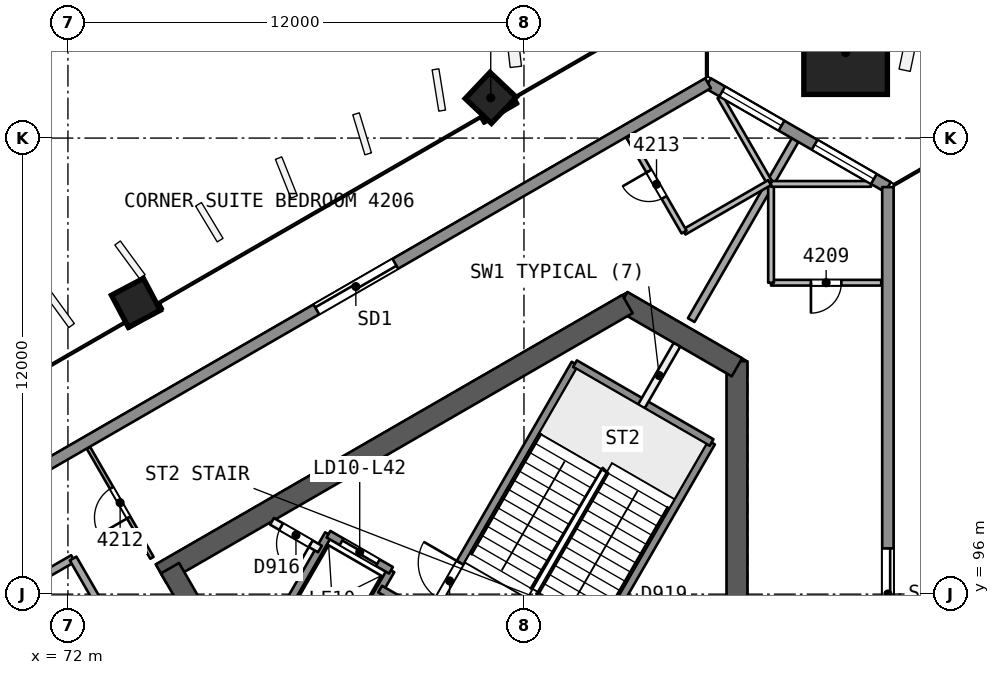
"""IFC4 building model, lengths in metres.
Left out: names, types, materials, properties, quantities, classifications, styles, units other than length and angle.
Written with IfcOpenShell. Run it as: python <this file> out.ifc"""

import sys

from ifc_helpers import new_model, si_unit, direction, frame, frame_2d, origin, origin_2d, place, context, subcontext, project, spatial, rectangle, extrude, element, fill, save


model = new_model("IFC4")
c1 = context("Model", 3, precision=1e-05, world=origin(), true_north=direction((0.0, 1.0)))
c2 = subcontext(c1, "Body", "Model", "MODEL_VIEW")
j1 = project(units=[si_unit("LENGTHUNIT", "METRE"), si_unit("PLANEANGLEUNIT", "RADIAN")], contexts=[c1])
p1 = place(None, origin())
s1 = spatial("IfcSite", under=j1, at=p1, CompositionType="ELEMENT")
p2 = place(p1, origin())
s2 = spatial("IfcBuilding", under=s1, at=p2, CompositionType="ELEMENT")
p3 = place(p2, frame((0.0, 0.0, 174.8)))
s3 = spatial("IfcBuildingStorey", under=s2, at=p3, CompositionType="ELEMENT", Elevation=174.8)
p4 = place(p3, frame((89.605, 88.069, 0.0), z_axis=(0.0, 0.0, 1.0), x_axis=(0.0, 1.0, 0.0)))
e1 = element("IfcWall", 1, at=p4, inside=s3, PredefinedType="SHEAR", context=c2, shape_type="SweptSolid", body=[
    extrude(rectangle(XDim=14.058, YDim=0.55, at=frame_2d((7.029, 0.0))), origin(), (0.0, 0.0, 1.0), 3.7),
])
p5 = place(p3, frame((89.605, 101.969, 0.0), z_axis=(0.0, 0.0, 1.0), x_axis=(-0.865997833373, 0.500047750313, 0.0)))
e2 = element("IfcWall", 2, at=p5, inside=s3, PredefinedType="SHEAR", context=c2, shape_type="SweptSolid", body=[
    extrude(rectangle(XDim=3.487, YDim=0.55, at=frame_2d((1.743, 0.0))), origin(), (0.0, 0.0, 1.0), 3.7),
])
p6 = place(p3, frame((86.723, 103.633, 0.0), z_axis=(0.0, 0.0, 1.0), x_axis=(-0.866023530946, -0.500003243837, 0.0)))
e3 = element("IfcWall", 3, at=p6, inside=s3, PredefinedType="SHEAR", context=c2, shape_type="SweptSolid", body=[
    extrude(rectangle(XDim=14.175, YDim=0.55, at=frame_2d((7.087, 0.0))), origin(), (0.0, 0.0, 1.0), 3.7),
])
p7 = place(p3, frame((74.686, 96.683, 0.0), z_axis=(0.0, 0.0, 1.0), x_axis=(0.499997818338, -0.866026663364, 0.0)))
e4 = element("IfcWall", 4, at=p7, inside=s3, PredefinedType="SHEAR", context=c2, shape_type="SweptSolid", body=[
    extrude(rectangle(XDim=10.105, YDim=0.55, at=frame_2d((5.052, 0.0))), origin(), (0.0, 0.0, 1.0), 3.7),
])
p8 = place(p7, frame((7.955, 0.0, 0.0)))
e5 = element("IfcOpeningElement", 5, at=p8, cuts=e4, PredefinedType="OPENING", context=c2, shape_type="SweptSolid", body=[
    extrude(rectangle(XDim=1.2, YDim=2.1, at=frame_2d((0.6, 1.05))), frame((0.0, 0.286, 0.0), z_axis=(0.0, -1.0, 0.0), x_axis=(1.0, 0.0, 0.0)), (0.0, 0.0, 1.0), 0.571),
])
p9 = place(p3, frame((92.485, 110.285, 0.0), z_axis=(-0.017607037296, -0.030466109479, 0.999380712447), x_axis=(0.86581098392, -0.500371202332, 2.457e-09)))
e6 = element("IfcColumn", 6, at=p9, inside=s3, PredefinedType="COLUMN", context=c2, shape_type="SweptSolid", body=[
    extrude(rectangle(XDim=2.2, YDim=2.2, at=origin_2d()), origin(), (0.0, 0.0, 1.0), 3.702),
])
p10 = place(p3, frame((83.135, 109.092, 0.0), z_axis=(-0.008376454378, -0.028163354484, 0.999568237028), x_axis=(0.86584908167, 0.499849974805, 0.021339410928)))
e7 = element("IfcColumn", 7, at=p10, inside=s3, PredefinedType="COLUMN", context=c2, shape_type="SweptSolid", body=[
    extrude(rectangle(XDim=0.95, YDim=0.95, at=origin_2d()), origin(), (0.0, 0.0, 1.0), 3.702),
])
p11 = place(p3, frame((73.786, 103.694, 0.0), z_axis=(0.000857578916, -0.022824792675, 0.999739112668), x_axis=(0.866054303765, 0.499836094294, 0.010668728649)))
e8 = element("IfcColumn", 8, at=p11, inside=s3, PredefinedType="COLUMN", context=c2, shape_type="SweptSolid", body=[
    extrude(rectangle(XDim=0.95, YDim=0.95, at=origin_2d()), origin(), (0.0, 0.0, 1.0), 3.701),
])
p12 = place(p3, frame((93.402, 104.194, 0.0), z_axis=(0.0, 0.0, 1.0), x_axis=(-1.0, 0.0, 0.0)))
e9 = element("IfcWall", 9, at=p12, inside=s3, PredefinedType="PARTITIONING", context=c2, shape_type="SweptSolid", body=[
    extrude(rectangle(XDim=2.9, YDim=0.15, at=frame_2d((1.45, 0.0))), origin(), (0.0, 0.0, 1.0), 3.25),
])
p13 = place(p12, frame((1.05, 0.0, 0.0)))
e10 = element("IfcOpeningElement", 10, at=p13, cuts=e9, PredefinedType="OPENING", context=c2, shape_type="SweptSolid", body=[
    extrude(rectangle(XDim=0.8, YDim=2.1, at=frame_2d((0.4, 1.05))), frame((0.0, 0.085, 0.0), z_axis=(0.0, -1.0, 0.0), x_axis=(1.0, 0.0, 0.0)), (0.0, 0.0, 1.0), 0.171),
])
p14 = place(p3, frame((90.501, 104.194, 0.0), z_axis=(0.0, 0.0, 1.0), x_axis=(0.0, 1.0, 0.0)))
e11 = element("IfcWall", 11, at=p14, inside=s3, PredefinedType="PARTITIONING", context=c2, shape_type="SweptSolid", body=[
    extrude(rectangle(XDim=2.6, YDim=0.15, at=frame_2d((1.3, 0.0))), origin(), (0.0, 0.0, 1.0), 3.25),
])
p15 = place(p3, frame((90.501, 106.794, 0.0), z_axis=(0.0, 0.0, 1.0), x_axis=(1.0, 0.0, 0.0)))
e12 = element("IfcWall", 12, at=p15, inside=s3, PredefinedType="PARTITIONING", context=c2, shape_type="SweptSolid", body=[
    extrude(rectangle(XDim=2.632, YDim=0.15, at=frame_2d((1.316, 0.0))), origin(), (0.0, 0.0, 1.0), 3.25),
])
p16 = place(p3, frame((91.135, 107.948, 0.0), z_axis=(0.0, 0.0, 1.0), x_axis=(-0.499980071345, -0.866036909293, 0.0)))
e13 = element("IfcWall", 13, at=p16, inside=s3, PredefinedType="PARTITIONING", context=c2, shape_type="SweptSolid", body=[
    extrude(rectangle(XDim=5.469, YDim=0.2, at=frame_2d((2.734, 0.0))), origin(), (0.0, 0.0, 1.0), 3.25),
])
p17 = place(p3, frame((74.21, 96.956, 0.0), z_axis=(0.0, 0.0, 1.0), x_axis=(-0.499981198768, 0.866036258409, 0.0)))
e14 = element("IfcWall", 14, at=p17, inside=s3, PredefinedType="PARTITIONING", context=c2, shape_type="SweptSolid", body=[
    extrude(rectangle(XDim=3.349, YDim=0.1, at=frame_2d((1.674, 0.0))), origin(), (0.0, 0.0, 1.0), 3.25),
])
p18 = place(p17, frame((1.224, 0.0, 0.0)))
e15 = element("IfcOpeningElement", 15, at=p18, cuts=e14, PredefinedType="OPENING", context=c2, shape_type="SweptSolid", body=[
    extrude(rectangle(XDim=0.9, YDim=2.1, at=frame_2d((0.45, 1.05))), frame((0.0, 0.061, 0.0), z_axis=(0.0, -1.0, 0.0), x_axis=(1.0, 0.0, 0.0)), (0.0, 0.0, 1.0), 0.121),
])
p19 = place(p3, frame((74.904, 88.143, 0.0), z_axis=(0.0, 0.0, 1.0), x_axis=(-0.499990139034, 0.866031096941, 0.0)))
e16 = element("IfcWall", 16, at=p19, inside=s3, PredefinedType="PARTITIONING", context=c2, shape_type="SweptSolid", body=[
    extrude(rectangle(XDim=9.0, YDim=0.2, at=frame_2d((4.5, 0.0))), origin(), (0.0, 0.0, 1.0), 3.25),
])
p20 = place(p19, frame((4.05, 0.0, 0.0)))
e17 = element("IfcOpeningElement", 17, at=p20, cuts=e16, PredefinedType="OPENING", context=c2, shape_type="SweptSolid", body=[
    extrude(rectangle(XDim=0.9, YDim=2.1, at=frame_2d((0.45, 1.05))), frame((0.0, 0.11, 0.0), z_axis=(0.0, -1.0, 0.0), x_axis=(1.0, 0.0, 0.0)), (0.0, 0.0, 1.0), 0.221),
])
p21 = place(p3, frame((70.404, 95.937, 0.0), z_axis=(0.0, 0.0, 1.0), x_axis=(0.866010750942, 0.50002537861, 0.0)))
e18 = element("IfcWall", 18, at=p21, inside=s3, PredefinedType="PARTITIONING", context=c2, shape_type="SweptSolid", body=[
    extrude(rectangle(XDim=2.0, YDim=0.2, at=frame_2d((1.0, 0.0))), origin(), (0.0, 0.0, 1.0), 3.25),
])
p22 = place(p3, frame((72.136, 96.937, 0.0), z_axis=(0.0, 0.0, 1.0), x_axis=(0.499990139034, -0.866031096941, 0.0)))
e19 = element("IfcWall", 19, at=p22, inside=s3, PredefinedType="PARTITIONING", context=c2, shape_type="SweptSolid", body=[
    extrude(rectangle(XDim=9.0, YDim=0.2, at=frame_2d((4.5, 0.0))), origin(), (0.0, 0.0, 1.0), 3.25),
])
p23 = place(p3, frame((67.676, 97.05, 0.0), z_axis=(0.0, 0.0, 1.0), x_axis=(0.499998569178, -0.866026229868, 0.0)))
e20 = element("IfcWall", 20, at=p23, inside=s3, PredefinedType="PARTITIONING", context=c2, shape_type="SweptSolid", body=[
    extrude(rectangle(XDim=11.328, YDim=0.2, at=frame_2d((5.664, 0.0))), origin(), (0.0, 0.0, 1.0), 3.25),
])
p24 = place(p3, frame((89.159, 109.089, 0.0), z_axis=(0.0, 0.0, 1.0), x_axis=(0.499981517636, -0.866036074319, 0.0)))
e21 = element("IfcWall", 21, at=p24, inside=s3, PredefinedType="PARTITIONING", context=c2, shape_type="SweptSolid", body=[
    extrude(rectangle(XDim=2.61, YDim=0.15, at=frame_2d((1.305, 0.0))), origin(), (0.0, 0.0, 1.0), 3.25),
])
p25 = place(p3, frame((90.464, 106.828, 0.0), z_axis=(0.0, 0.0, 1.0), x_axis=(-0.866062058628, -0.499936506574, 0.0)))
e22 = element("IfcWall", 22, at=p25, inside=s3, PredefinedType="PARTITIONING", context=c2, shape_type="SweptSolid", body=[
    extrude(rectangle(XDim=2.6, YDim=0.15, at=frame_2d((1.3, 0.0))), origin(), (0.0, 0.0, 1.0), 3.25),
])
p26 = place(p3, frame((88.213, 105.528, 0.0), z_axis=(0.0, 0.0, 1.0), x_axis=(-0.499987231761, 0.866032775405, 0.0)))
e23 = element("IfcWall", 23, at=p26, inside=s3, PredefinedType="PARTITIONING", context=c2, shape_type="SweptSolid", body=[
    extrude(rectangle(XDim=2.9, YDim=0.15, at=frame_2d((1.45, 0.0))), origin(), (0.0, 0.0, 1.0), 3.25),
])
p27 = place(p26, frame((1.05, 0.0, 0.0)))
e24 = element("IfcOpeningElement", 24, at=p27, cuts=e23, PredefinedType="OPENING", context=c2, shape_type="SweptSolid", body=[
    extrude(rectangle(XDim=0.8, YDim=2.1, at=frame_2d((0.4, 1.05))), frame((0.0, 0.085, 0.0), z_axis=(0.0, -1.0, 0.0), x_axis=(1.0, 0.0, 0.0)), (0.0, 0.0, 1.0), 0.171),
])
p28 = place(p3, frame((88.844, 109.443, 0.0), z_axis=(0.0, 0.0, 1.0), x_axis=(0.866027138233, -0.499996995835, 0.0)))
e25 = element("IfcWall", 25, at=p28, inside=s3, PredefinedType="SOLIDWALL", context=c2, shape_type="SweptSolid", body=[
    extrude(rectangle(XDim=5.465, YDim=0.3, at=frame_2d((2.733, 0.0))), origin(), (0.0, 0.0, 1.0), 3.25),
])
p29 = place(p28, frame((3.239, 0.0, 0.9)))
e26 = element("IfcOpeningElement", 26, at=p29, cuts=e25, PredefinedType="OPENING", context=c2, shape_type="SweptSolid", body=[
    extrude(rectangle(XDim=1.8, YDim=1.5, at=frame_2d((0.9, 0.75))), frame((0.0, 0.161, 0.0), z_axis=(0.0, -1.0, 0.0), x_axis=(1.0, 0.0, 0.0)), (0.0, 0.0, 1.0), 0.321),
])
p30 = place(p28, frame((0.432, 0.0, 0.9)))
e27 = element("IfcOpeningElement", 27, at=p30, cuts=e25, PredefinedType="OPENING", context=c2, shape_type="SweptSolid", body=[
    extrude(rectangle(XDim=1.8, YDim=1.5, at=frame_2d((0.9, 0.75))), frame((0.0, 0.161, 0.0), z_axis=(0.0, -1.0, 0.0), x_axis=(1.0, 0.0, 0.0)), (0.0, 0.0, 1.0), 0.321),
])
p31 = place(p3, frame((93.577, 106.71, 0.0), z_axis=(0.0, 0.0, 1.0), x_axis=(0.0, -1.0, 0.0)))
e28 = element("IfcWall", 28, at=p31, inside=s3, PredefinedType="SOLIDWALL", context=c2, shape_type="SweptSolid", body=[
    extrude(rectangle(XDim=53.42, YDim=0.3, at=frame_2d((26.71, 0.0))), origin(), (0.0, 0.0, 1.0), 3.25),
])
p32 = place(p31, frame((31.122, 0.0, 0.0)))
e29 = element("IfcOpeningElement", 29, at=p32, cuts=e28, PredefinedType="OPENING", context=c2, shape_type="SweptSolid", body=[
    extrude(rectangle(XDim=2.4, YDim=2.4, at=frame_2d((1.2, 1.2))), frame((0.0, 0.161, 0.0), z_axis=(0.0, -1.0, 0.0), x_axis=(1.0, 0.0, 0.0)), (0.0, 0.0, 1.0), 0.321),
])
p33 = place(p31, frame((41.52, 0.0, 0.0)))
e30 = element("IfcOpeningElement", 30, at=p33, cuts=e28, PredefinedType="OPENING", context=c2, shape_type="SweptSolid", body=[
    extrude(rectangle(XDim=2.4, YDim=2.4, at=frame_2d((1.2, 1.2))), frame((0.0, 0.161, 0.0), z_axis=(0.0, -1.0, 0.0), x_axis=(1.0, 0.0, 0.0)), (0.0, 0.0, 1.0), 0.321),
])
p34 = place(p31, frame((19.742, 0.0, 0.0)))
e31 = element("IfcOpeningElement", 31, at=p34, cuts=e28, PredefinedType="OPENING", context=c2, shape_type="SweptSolid", body=[
    extrude(rectangle(XDim=2.4, YDim=2.4, at=frame_2d((1.2, 1.2))), frame((0.0, 0.161, 0.0), z_axis=(0.0, -1.0, 0.0), x_axis=(1.0, 0.0, 0.0)), (0.0, 0.0, 1.0), 0.321),
])
p35 = place(p31, frame((9.507, 0.0, 0.0)))
e32 = element("IfcOpeningElement", 32, at=p35, cuts=e28, PredefinedType="OPENING", context=c2, shape_type="SweptSolid", body=[
    extrude(rectangle(XDim=2.4, YDim=2.4, at=frame_2d((1.2, 1.2))), frame((0.0, 0.161, 0.0), z_axis=(0.0, -1.0, 0.0), x_axis=(1.0, 0.0, 0.0)), (0.0, 0.0, 1.0), 0.321),
])
p36 = place(p31, frame((25.354, 0.0, 0.0)))
e33 = element("IfcOpeningElement", 33, at=p36, cuts=e28, PredefinedType="OPENING", context=c2, shape_type="SweptSolid", body=[
    extrude(rectangle(XDim=2.4, YDim=2.4, at=frame_2d((1.2, 1.2))), frame((0.0, 0.161, 0.0), z_axis=(0.0, -1.0, 0.0), x_axis=(1.0, 0.0, 0.0)), (0.0, 0.0, 1.0), 0.321),
])
p37 = place(p3, frame((42.58, 82.733, 0.0), z_axis=(0.0, 0.0, 1.0), x_axis=(0.866025382531, 0.500000036812, 0.0)))
e34 = element("IfcWall", 34, at=p37, inside=s3, PredefinedType="SOLIDWALL", context=c2, shape_type="SweptSolid", body=[
    extrude(rectangle(XDim=53.42, YDim=0.3, at=frame_2d((26.71, 0.0))), origin(), (0.0, 0.0, 1.0), 3.25),
])
p38 = place(p37, frame((30.499, 0.0, 0.0)))
e35 = element("IfcOpeningElement", 35, at=p38, cuts=e34, PredefinedType="OPENING", context=c2, shape_type="SweptSolid", body=[
    extrude(rectangle(XDim=2.4, YDim=2.4, at=frame_2d((1.2, 1.2))), frame((0.0, 0.161, 0.0), z_axis=(0.0, -1.0, 0.0), x_axis=(1.0, 0.0, 0.0)), (0.0, 0.0, 1.0), 0.321),
])
p39 = place(p37, frame((41.52, 0.0, 0.0)))
e36 = element("IfcOpeningElement", 36, at=p39, cuts=e34, PredefinedType="OPENING", context=c2, shape_type="SweptSolid", body=[
    extrude(rectangle(XDim=2.4, YDim=2.4, at=frame_2d((1.2, 1.2))), frame((0.0, 0.161, 0.0), z_axis=(0.0, -1.0, 0.0), x_axis=(1.0, 0.0, 0.0)), (0.0, 0.0, 1.0), 0.321),
])
p40 = place(p37, frame((19.742, 0.0, 0.0)))
e37 = element("IfcOpeningElement", 37, at=p40, cuts=e34, PredefinedType="OPENING", context=c2, shape_type="SweptSolid", body=[
    extrude(rectangle(XDim=2.4, YDim=2.4, at=frame_2d((1.2, 1.2))), frame((0.0, 0.161, 0.0), z_axis=(0.0, -1.0, 0.0), x_axis=(1.0, 0.0, 0.0)), (0.0, 0.0, 1.0), 0.321),
])
p41 = place(p37, frame((9.507, 0.0, 0.0)))
e38 = element("IfcOpeningElement", 38, at=p41, cuts=e34, PredefinedType="OPENING", context=c2, shape_type="SweptSolid", body=[
    extrude(rectangle(XDim=2.4, YDim=2.4, at=frame_2d((1.2, 1.2))), frame((0.0, 0.161, 0.0), z_axis=(0.0, -1.0, 0.0), x_axis=(1.0, 0.0, 0.0)), (0.0, 0.0, 1.0), 0.321),
])
p42 = place(p37, frame((26.512, 0.0, 0.9)))
e39 = element("IfcOpeningElement", 39, at=p42, cuts=e34, PredefinedType="OPENING", context=c2, shape_type="SweptSolid", body=[
    extrude(rectangle(XDim=1.8, YDim=1.5, at=frame_2d((0.9, 0.75))), frame((0.0, 0.161, 0.0), z_axis=(0.0, -1.0, 0.0), x_axis=(1.0, 0.0, 0.0)), (0.0, 0.0, 1.0), 0.321),
])
p43 = place(p37, frame((23.55, 0.0, 0.9)))
e40 = element("IfcOpeningElement", 40, at=p43, cuts=e34, PredefinedType="OPENING", context=c2, shape_type="SweptSolid", body=[
    extrude(rectangle(XDim=1.8, YDim=1.5, at=frame_2d((0.9, 0.75))), frame((0.0, 0.161, 0.0), z_axis=(0.0, -1.0, 0.0), x_axis=(1.0, 0.0, 0.0)), (0.0, 0.0, 1.0), 0.321),
])
p44 = place(p3, frame((85.087, 93.321, 0.0), z_axis=(0.0, 0.0, 1.0), x_axis=(0.500019787375, 0.866013979237, 0.0)))
e41 = element("IfcWall", 41, at=p44, inside=s3, PredefinedType="SOLIDWALL", context=c2, shape_type="SweptSolid", body=[
    extrude(rectangle(XDim=7.7, YDim=0.2, at=frame_2d((3.85, 0.0))), origin(), (0.0, 0.0, 1.0), 3.25),
])
p45 = place(p3, frame((87.09, 100.94, 0.0), z_axis=(0.0, 0.0, 1.0), x_axis=(0.499951854219, 0.86605319898, 0.0)))
e42 = element("IfcWall", 42, at=p45, inside=s3, PredefinedType="PARTITIONING", context=c2, shape_type="SweptSolid", body=[
    extrude(rectangle(XDim=1.873, YDim=0.2, at=frame_2d((0.937, 0.0))), origin(), (0.0, 0.0, 1.0), 3.25),
])
p46 = place(p3, frame((81.493, 95.396, 0.0), z_axis=(0.0, 0.0, 1.0), x_axis=(0.500006057782, 0.866021906294, 0.0)))
e43 = element("IfcWall", 43, at=p46, inside=s3, PredefinedType="SOLIDWALL", context=c2, shape_type="SweptSolid", body=[
    extrude(rectangle(XDim=7.7, YDim=0.2, at=frame_2d((3.85, 0.0))), origin(), (0.0, 0.0, 1.0), 3.25),
])
p47 = place(p46, frame((0.55, 0.0, 0.0)))
e44 = element("IfcOpeningElement", 44, at=p47, cuts=e43, PredefinedType="OPENING", context=c2, shape_type="SweptSolid", body=[
    extrude(rectangle(XDim=1.1, YDim=2.1, at=frame_2d((0.55, 1.05))), frame((0.0, 0.11, 0.0), z_axis=(0.0, -1.0, 0.0), x_axis=(1.0, 0.0, 0.0)), (0.0, 0.0, 1.0), 0.221),
])
for number, where, z_axis, x_axis in (
    (45, (78.976, 93.986, 0.0), (0.0, 0.0, 1.0), (0.5, 0.866, 0.0)),
    (46, (77.33, 94.936, 0.0), (0.0, 0.0, 1.0), (0.5, 0.866, 0.0)),
):
    element("IfcWall", number, at=place(p3, frame(where, z_axis=z_axis, x_axis=x_axis)), inside=s3, PredefinedType="SOLIDWALL", context=c2, shape_type="SweptSolid", body=[
        extrude(rectangle(XDim=3.05, YDim=0.2, at=frame_2d((1.525, 0.0))), origin(), (0.0, 0.0, 1.0), 3.25),
    ])
p48 = place(p3, frame((89.33, 90.872, 0.0), z_axis=(0.0, 0.0, 1.0), x_axis=(-0.866027589512, 0.49999621419, 0.0)))
e47 = element("IfcWall", 47, at=p48, inside=s3, PredefinedType="SOLIDWALL", context=c2, shape_type="SweptSolid", body=[
    extrude(rectangle(XDim=10.524, YDim=0.2, at=frame_2d((5.262, 0.0))), origin(), (0.0, 0.0, 1.0), 3.25),
])
p49 = place(p48, frame((0.312, 0.0, 0.0)))
e48 = element("IfcOpeningElement", 48, at=p49, cuts=e47, PredefinedType="OPENING", context=c2, shape_type="SweptSolid", body=[
    extrude(rectangle(XDim=0.9, YDim=2.1, at=frame_2d((0.45, 1.05))), frame((0.0, 0.11, 0.0), z_axis=(0.0, -1.0, 0.0), x_axis=(1.0, 0.0, 0.0)), (0.0, 0.0, 1.0), 0.221),
])
p50 = place(p3, frame((78.63, 97.188, 0.0), z_axis=(0.0, 0.0, 1.0), x_axis=(-0.866003949776, 0.500037157592, 0.0)))
e49 = element("IfcWall", 49, at=p50, inside=s3, PredefinedType="PARTITIONING", context=c2, shape_type="SweptSolid", body=[
    extrude(rectangle(XDim=1.455, YDim=0.2, at=frame_2d((0.728, 0.0))), origin(), (0.0, 0.0, 1.0), 3.25),
])
p51 = place(p50, frame((0.278, 0.0, 0.0)))
e50 = element("IfcOpeningElement", 50, at=p51, cuts=e49, PredefinedType="OPENING", context=c2, shape_type="SweptSolid", body=[
    extrude(rectangle(XDim=0.9, YDim=2.1, at=frame_2d((0.45, 1.05))), frame((0.0, 0.11, 0.0), z_axis=(0.0, -1.0, 0.0), x_axis=(1.0, 0.0, 0.0)), (0.0, 0.0, 1.0), 0.221),
])
p52 = place(p3, frame((80.5, 96.627, 0.0), z_axis=(0.0, 0.0, 1.0), x_axis=(-0.86601224135, 0.500022797313, 0.0)))
e51 = element("IfcWall", 51, at=p52, inside=s3, PredefinedType="SOLIDWALL", context=c2, shape_type="SweptSolid", body=[
    extrude(rectangle(XDim=1.9, YDim=0.2, at=frame_2d((0.95, 0.0))), origin(), (0.0, 0.0, 1.0), 3.25),
])
p53 = place(p52, frame((0.4, 0.0, 0.0)))
e52 = element("IfcOpeningElement", 52, at=p53, cuts=e51, PredefinedType="OPENING", context=c2, shape_type="SweptSolid", body=[
    extrude(rectangle(XDim=1.1, YDim=2.1, at=frame_2d((0.55, 1.05))), frame((0.0, 0.11, 0.0), z_axis=(0.0, -1.0, 0.0), x_axis=(1.0, 0.0, 0.0)), (0.0, 0.0, 1.0), 0.221),
])
p54 = place(p3, frame((88.937, 99.99, 0.0), z_axis=(0.0, 0.0, 1.0), x_axis=(-0.866004344652, 0.500036473714, 0.0)))
e53 = element("IfcWall", 53, at=p54, inside=s3, PredefinedType="SOLIDWALL", context=c2, shape_type="SweptSolid", body=[
    extrude(rectangle(XDim=4.15, YDim=0.2, at=frame_2d((2.075, 0.0))), origin(), (0.0, 0.0, 1.0), 3.25),
])
p55 = place(p13, origin())
e54 = element("IfcDoor", 54, at=p55, inside=s3, OperationType="SINGLE_SWING_RIGHT", PredefinedType="NOTDEFINED", context=c2, shape_type="SweptSolid", body=[
    extrude(rectangle(XDim=0.8, YDim=2.1, at=frame_2d((0.4, 1.05))), frame((0.0, 0.025, 0.0), z_axis=(0.0, -1.0, 0.0), x_axis=(1.0, 0.0, 0.0)), (0.0, 0.0, 1.0), 0.05),
])
fill(e10, e54)
p56 = place(p18, origin())
e55 = element("IfcDoor", 55, at=p56, inside=s3, OperationType="SINGLE_SWING_LEFT", PredefinedType="NOTDEFINED", context=c2, shape_type="SweptSolid", body=[
    extrude(rectangle(XDim=0.9, YDim=2.1, at=frame_2d((0.45, 1.05))), frame((0.0, 0.025, 0.0), z_axis=(0.0, -1.0, 0.0), x_axis=(1.0, 0.0, 0.0)), (0.0, 0.0, 1.0), 0.05),
])
fill(e15, e55)
p57 = place(p27, origin())
e56 = element("IfcDoor", 56, at=p57, inside=s3, OperationType="SINGLE_SWING_RIGHT", PredefinedType="NOTDEFINED", context=c2, shape_type="SweptSolid", body=[
    extrude(rectangle(XDim=0.8, YDim=2.1, at=frame_2d((0.4, 1.05))), frame((0.0, 0.025, 0.0), z_axis=(0.0, -1.0, 0.0), x_axis=(1.0, 0.0, 0.0)), (0.0, 0.0, 1.0), 0.05),
])
fill(e24, e56)
p58 = place(p29, origin())
e57 = element("IfcWindow", 57, at=p58, inside=s3, PartitioningType="SINGLE_PANEL", PredefinedType="WINDOW", context=c2, shape_type="SweptSolid", body=[
    extrude(rectangle(XDim=1.8, YDim=1.5, at=frame_2d((0.9, 0.75))), frame((0.0, 0.03, 0.0), z_axis=(0.0, -1.0, 0.0), x_axis=(1.0, 0.0, 0.0)), (0.0, 0.0, 1.0), 0.06),
])
fill(e26, e57)
p59 = place(p30, origin())
e58 = element("IfcWindow", 58, at=p59, inside=s3, PartitioningType="SINGLE_PANEL", PredefinedType="WINDOW", context=c2, shape_type="SweptSolid", body=[
    extrude(rectangle(XDim=1.8, YDim=1.5, at=frame_2d((0.9, 0.75))), frame((0.0, 0.03, 0.0), z_axis=(0.0, -1.0, 0.0), x_axis=(1.0, 0.0, 0.0)), (0.0, 0.0, 1.0), 0.06),
])
fill(e27, e58)
p60 = place(p35, origin())
e59 = element("IfcDoor", 59, at=p60, inside=s3, OperationType="SLIDING_TO_RIGHT", PredefinedType="NOTDEFINED", context=c2, shape_type="SweptSolid", body=[
    extrude(rectangle(XDim=2.4, YDim=2.4, at=frame_2d((1.2, 1.2))), frame((0.0, 0.025, 0.0), z_axis=(0.0, -1.0, 0.0), x_axis=(1.0, 0.0, 0.0)), (0.0, 0.0, 1.0), 0.05),
])
fill(e32, e59)
p61 = place(p39, origin())
e60 = element("IfcDoor", 60, at=p61, inside=s3, OperationType="SLIDING_TO_RIGHT", PredefinedType="NOTDEFINED", context=c2, shape_type="SweptSolid", body=[
    extrude(rectangle(XDim=2.4, YDim=2.4, at=frame_2d((1.2, 1.2))), frame((0.0, 0.025, 0.0), z_axis=(0.0, -1.0, 0.0), x_axis=(1.0, 0.0, 0.0)), (0.0, 0.0, 1.0), 0.05),
])
fill(e36, e60)
p62 = place(p53, origin())
e61 = element("IfcDoor", 61, at=p62, inside=s3, OperationType="SLIDING_TO_RIGHT", PredefinedType="NOTDEFINED", context=c2, shape_type="SweptSolid", body=[
    extrude(rectangle(XDim=1.1, YDim=2.1, at=frame_2d((0.55, 1.05))), frame((0.0, 0.025, 0.0), z_axis=(0.0, -1.0, 0.0), x_axis=(1.0, 0.0, 0.0)), (0.0, 0.0, 1.0), 0.05),
])
fill(e52, e61)
p63 = place(p51, origin())
e62 = element("IfcDoor", 62, at=p63, inside=s3, OperationType="SINGLE_SWING_LEFT", PredefinedType="NOTDEFINED", context=c2, shape_type="SweptSolid", body=[
    extrude(rectangle(XDim=0.9, YDim=2.1, at=frame_2d((0.45, 1.05))), frame((0.0, 0.025, 0.0), z_axis=(0.0, -1.0, 0.0), x_axis=(1.0, 0.0, 0.0)), (0.0, 0.0, 1.0), 0.05),
])
fill(e50, e62)
p64 = place(p47, origin())
e63 = element("IfcDoor", 63, at=p64, inside=s3, OperationType="SINGLE_SWING_RIGHT", PredefinedType="NOTDEFINED", context=c2, shape_type="SweptSolid", body=[
    extrude(rectangle(XDim=1.1, YDim=2.1, at=frame_2d((0.55, 1.05))), frame((0.0, 0.025, 0.0), z_axis=(0.0, -1.0, 0.0), x_axis=(1.0, 0.0, 0.0)), (0.0, 0.0, 1.0), 0.05),
])
fill(e44, e63)
save(model, sys.argv[1])
